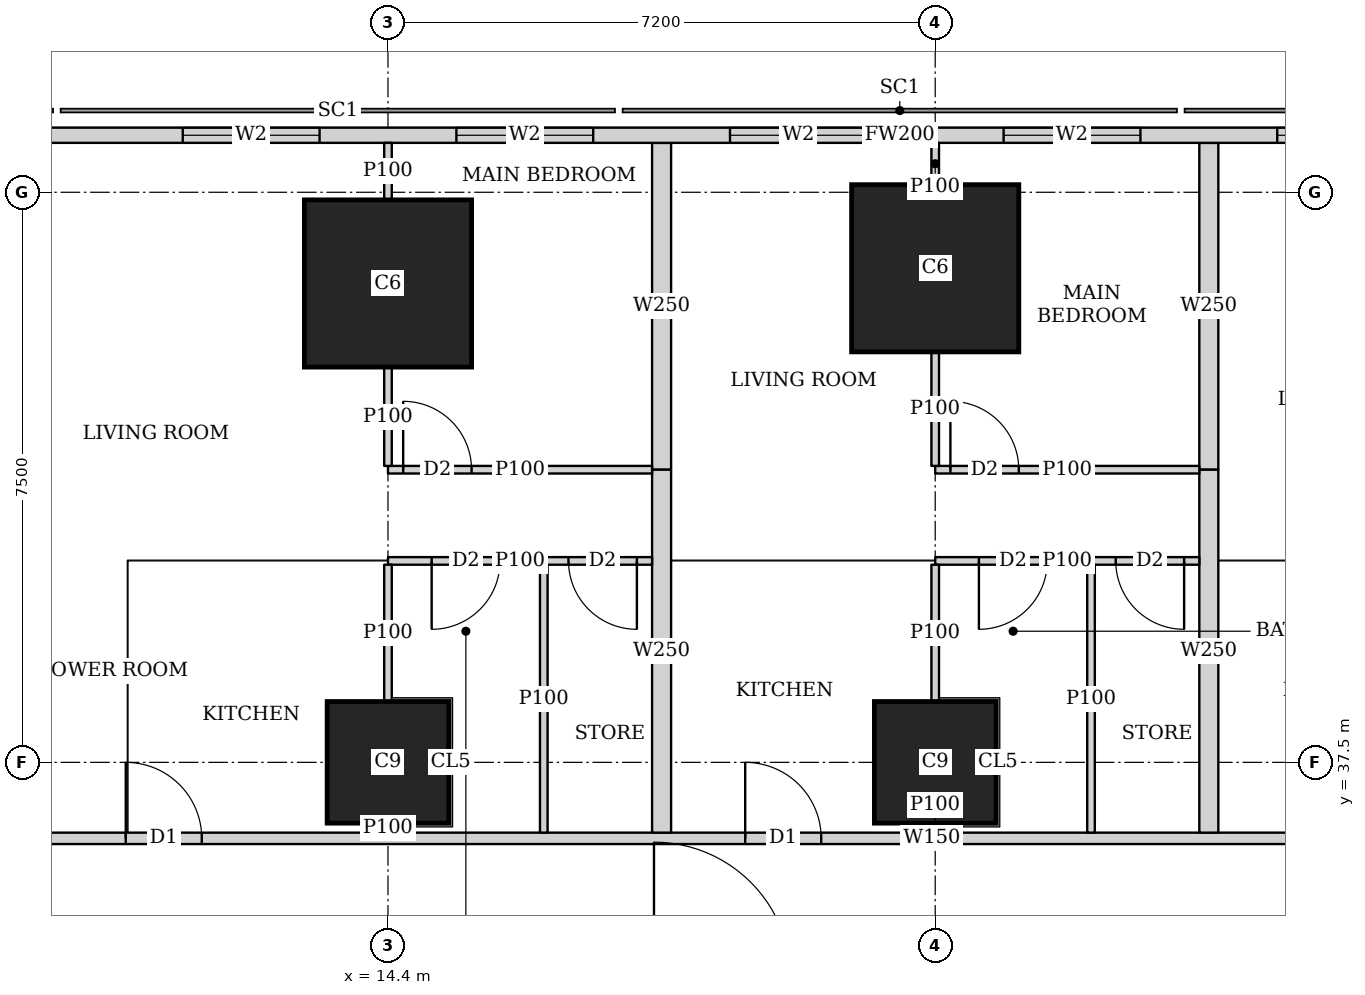
"""IFC4 building model, lengths in metres.
Left out: names, types, materials, properties, quantities, classifications, styles, units other than length and angle.
Written with IfcOpenShell. Run it as: python <this file> out.ifc"""

import sys

from ifc_helpers import new_model, si_unit, direction, frame, frame_2d, origin, origin_2d, place, context, subcontext, project, spatial, rectangle, extrude, element, fill, save


model = new_model("IFC4")
c1 = context("Model", 3, precision=1e-05, world=origin(), true_north=direction((0.0, 1.0)))
c2 = subcontext(c1, "Body", "Model", "MODEL_VIEW")
j1 = project(units=[si_unit("LENGTHUNIT", "METRE"), si_unit("PLANEANGLEUNIT", "RADIAN")], contexts=[c1])
p1 = place(None, origin())
s1 = spatial("IfcSite", under=j1, at=p1, CompositionType="ELEMENT")
p2 = place(p1, origin())
s2 = spatial("IfcBuilding", under=s1, at=p2, CompositionType="ELEMENT")
p3 = place(p2, frame((0.0, 0.0, 89.15)))
s3 = spatial("IfcBuildingStorey", under=s2, at=p3, CompositionType="ELEMENT", Elevation=89.15)
for number, where, z_axis, x_axis in (
    (1, (14.4, 37.5, 0.0), (0.0, 0.0, 1.0), (1.0, 0.0, 0.0)),
    (2, (21.6, 37.5, 0.0), (0.0, 0.0, 1.0), (1.0, 0.0, 0.0)),
):
    element("IfcColumn", number, at=place(p3, frame(where, z_axis=z_axis, x_axis=x_axis)), inside=s3, PredefinedType="COLUMN", context=c2, shape_type="SweptSolid", body=[
        extrude(rectangle(XDim=1.6, YDim=1.6, at=origin_2d()), origin(), (0.0, 0.0, 1.0), 3.75),
    ])
for number, where, z_axis, x_axis in (
    (3, (14.4, 43.8, 0.0), (0.0, 0.0, 1.0), (1.0, 0.0, 0.0)),
    (4, (21.6, 44.0, 0.0), (0.0, 0.0, 1.0), (1.0, 0.0, 0.0)),
):
    element("IfcColumn", number, at=place(p3, frame(where, z_axis=z_axis, x_axis=x_axis)), inside=s3, PredefinedType="COLUMN", context=c2, shape_type="SweptSolid", body=[
        extrude(rectangle(XDim=2.2, YDim=2.2, at=origin_2d()), origin(), (0.0, 0.0, 1.0), 3.75),
    ])
p4 = place(p3, frame((40.106, 45.75, 0.0), z_axis=(0.0, 0.0, 1.0), x_axis=(-1.0, 0.0, 0.0)))
e5 = element("IfcWall", 5, at=p4, inside=s3, PredefinedType="SOLIDWALL", context=c2, shape_type="SweptSolid", body=[
    extrude(rectangle(XDim=37.943, YDim=0.2, at=frame_2d((18.971, 0.0))), origin(), (0.0, 0.0, 1.0), 3.5),
])
p5 = place(p4, frame((8.606, 0.0, 0.9)))
e6 = element("IfcOpeningElement", 6, at=p5, cuts=e5, PredefinedType="OPENING", context=c2, shape_type="SweptSolid", body=[
    extrude(rectangle(XDim=1.8, YDim=1.5, at=frame_2d((0.9, 0.75))), frame((0.0, 0.11, 0.0), z_axis=(0.0, -1.0, 0.0), x_axis=(1.0, 0.0, 0.0)), (0.0, 0.0, 1.0), 0.22),
])
p6 = place(p4, frame((12.206, 0.0, 0.9)))
e7 = element("IfcOpeningElement", 7, at=p6, cuts=e5, PredefinedType="OPENING", context=c2, shape_type="SweptSolid", body=[
    extrude(rectangle(XDim=1.8, YDim=1.5, at=frame_2d((0.9, 0.75))), frame((0.0, 0.11, 0.0), z_axis=(0.0, -1.0, 0.0), x_axis=(1.0, 0.0, 0.0)), (0.0, 0.0, 1.0), 0.22),
])
p7 = place(p4, frame((15.806, 0.0, 0.9)))
e8 = element("IfcOpeningElement", 8, at=p7, cuts=e5, PredefinedType="OPENING", context=c2, shape_type="SweptSolid", body=[
    extrude(rectangle(XDim=1.8, YDim=1.5, at=frame_2d((0.9, 0.75))), frame((0.0, 0.11, 0.0), z_axis=(0.0, -1.0, 0.0), x_axis=(1.0, 0.0, 0.0)), (0.0, 0.0, 1.0), 0.22),
])
p8 = place(p4, frame((19.406, 0.0, 0.9)))
e9 = element("IfcOpeningElement", 9, at=p8, cuts=e5, PredefinedType="OPENING", context=c2, shape_type="SweptSolid", body=[
    extrude(rectangle(XDim=1.8, YDim=1.5, at=frame_2d((0.9, 0.75))), frame((0.0, 0.11, 0.0), z_axis=(0.0, -1.0, 0.0), x_axis=(1.0, 0.0, 0.0)), (0.0, 0.0, 1.0), 0.22),
])
p9 = place(p4, frame((23.006, 0.0, 0.9)))
e10 = element("IfcOpeningElement", 10, at=p9, cuts=e5, PredefinedType="OPENING", context=c2, shape_type="SweptSolid", body=[
    extrude(rectangle(XDim=1.8, YDim=1.5, at=frame_2d((0.9, 0.75))), frame((0.0, 0.11, 0.0), z_axis=(0.0, -1.0, 0.0), x_axis=(1.0, 0.0, 0.0)), (0.0, 0.0, 1.0), 0.22),
])
p10 = place(p4, frame((26.606, 0.0, 0.9)))
e11 = element("IfcOpeningElement", 11, at=p10, cuts=e5, PredefinedType="OPENING", context=c2, shape_type="SweptSolid", body=[
    extrude(rectangle(XDim=1.8, YDim=1.5, at=frame_2d((0.9, 0.75))), frame((0.0, 0.11, 0.0), z_axis=(0.0, -1.0, 0.0), x_axis=(1.0, 0.0, 0.0)), (0.0, 0.0, 1.0), 0.22),
])
p11 = place(p3, frame((8.35, 36.5, 0.0), z_axis=(0.0, 0.0, 1.0), x_axis=(1.0, 0.0, 0.0)))
e12 = element("IfcWall", 12, at=p11, inside=s3, PredefinedType="SOLIDWALL", context=c2, shape_type="SweptSolid", body=[
    extrude(rectangle(XDim=26.415, YDim=0.15, at=frame_2d((13.208, 0.0))), origin(), (0.0, 0.0, 1.0), 3.5),
])
p12 = place(p11, frame((2.6, 0.0, 0.0)))
e13 = element("IfcOpeningElement", 13, at=p12, cuts=e12, PredefinedType="OPENING", context=c2, shape_type="SweptSolid", body=[
    extrude(rectangle(XDim=1.0, YDim=2.1, at=frame_2d((0.5, 1.05))), frame((0.0, 0.085, 0.0), z_axis=(0.0, -1.0, 0.0), x_axis=(1.0, 0.0, 0.0)), (0.0, 0.0, 1.0), 0.17),
])
p13 = place(p11, frame((10.75, 0.0, 0.0)))
e14 = element("IfcOpeningElement", 14, at=p13, cuts=e12, PredefinedType="OPENING", context=c2, shape_type="SweptSolid", body=[
    extrude(rectangle(XDim=1.0, YDim=2.1, at=frame_2d((0.5, 1.05))), frame((0.0, 0.085, 0.0), z_axis=(0.0, -1.0, 0.0), x_axis=(1.0, 0.0, 0.0)), (0.0, 0.0, 1.0), 0.17),
])
p14 = place(p11, frame((18.007, 0.0, 0.0)))
e15 = element("IfcOpeningElement", 15, at=p14, cuts=e12, PredefinedType="OPENING", context=c2, shape_type="SweptSolid", body=[
    extrude(rectangle(XDim=1.0, YDim=2.1, at=frame_2d((0.5, 1.05))), frame((0.0, 0.085, 0.0), z_axis=(0.0, -1.0, 0.0), x_axis=(1.0, 0.0, 0.0)), (0.0, 0.0, 1.0), 0.17),
])
p15 = place(p3, frame((14.4, 41.35, 0.0), z_axis=(0.0, 0.0, 1.0), x_axis=(1.0, 0.0, 0.0)))
e16 = element("IfcWall", 16, at=p15, inside=s3, PredefinedType="PARTITIONING", context=c2, shape_type="SweptSolid", body=[
    extrude(rectangle(XDim=3.475, YDim=0.1, at=frame_2d((1.738, 0.0))), origin(), (0.0, 0.0, 1.0), 3.5),
])
p16 = place(p15, frame((0.2, 0.0, 0.0)))
e17 = element("IfcOpeningElement", 17, at=p16, cuts=e16, PredefinedType="OPENING", context=c2, shape_type="SweptSolid", body=[
    extrude(rectangle(XDim=0.9, YDim=2.1, at=frame_2d((0.45, 1.05))), frame((0.0, 0.06, 0.0), z_axis=(0.0, -1.0, 0.0), x_axis=(1.0, 0.0, 0.0)), (0.0, 0.0, 1.0), 0.12),
])
p17 = place(p3, frame((14.4, 40.15, 0.0), z_axis=(0.0, 0.0, 1.0), x_axis=(1.0, 0.0, 0.0)))
e18 = element("IfcWall", 18, at=p17, inside=s3, PredefinedType="PARTITIONING", context=c2, shape_type="SweptSolid", body=[
    extrude(rectangle(XDim=3.475, YDim=0.1, at=frame_2d((1.738, 0.0))), origin(), (0.0, 0.0, 1.0), 3.5),
])
p18 = place(p17, frame((0.575, 0.0, 0.0)))
e19 = element("IfcOpeningElement", 19, at=p18, cuts=e18, PredefinedType="OPENING", context=c2, shape_type="SweptSolid", body=[
    extrude(rectangle(XDim=0.9, YDim=2.1, at=frame_2d((0.45, 1.05))), frame((0.0, 0.06, 0.0), z_axis=(0.0, -1.0, 0.0), x_axis=(1.0, 0.0, 0.0)), (0.0, 0.0, 1.0), 0.12),
])
p19 = place(p17, frame((2.375, 0.0, 0.0)))
e20 = element("IfcOpeningElement", 20, at=p19, cuts=e18, PredefinedType="OPENING", context=c2, shape_type="SweptSolid", body=[
    extrude(rectangle(XDim=0.9, YDim=2.1, at=frame_2d((0.45, 1.05))), frame((0.0, 0.06, 0.0), z_axis=(0.0, -1.0, 0.0), x_axis=(1.0, 0.0, 0.0)), (0.0, 0.0, 1.0), 0.12),
])
p20 = place(p3, frame((14.4, 41.4, 0.0), z_axis=(0.0, 0.0, 1.0), x_axis=(0.0, 1.0, 0.0)))
e21 = element("IfcWall", 21, at=p20, inside=s3, PredefinedType="PARTITIONING", context=c2, shape_type="SweptSolid", body=[
    extrude(rectangle(XDim=1.299, YDim=0.1, at=frame_2d((0.649, 0.0))), origin(), (0.0, 0.0, 1.0), 3.5),
])
p21 = place(p3, frame((14.4, 44.901, 0.0), z_axis=(0.0, 0.0, 1.0), x_axis=(0.0, 1.0, 0.0)))
e22 = element("IfcWall", 22, at=p21, inside=s3, PredefinedType="PARTITIONING", context=c2, shape_type="SweptSolid", body=[
    extrude(rectangle(XDim=0.749, YDim=0.1, at=frame_2d((0.375, 0.0))), origin(), (0.0, 0.0, 1.0), 3.5),
])
p22 = place(p3, frame((14.4, 36.575, 0.0), z_axis=(0.0, 0.0, 1.0), x_axis=(0.0, 1.0, 0.0)))
e23 = element("IfcWall", 23, at=p22, inside=s3, PredefinedType="PARTITIONING", context=c2, shape_type="SweptSolid", body=[
    extrude(rectangle(XDim=0.124, YDim=0.1, at=frame_2d((0.062, 0.0))), origin(), (0.0, 0.0, 1.0), 3.5),
])
p23 = place(p3, frame((14.4, 38.301, 0.0), z_axis=(0.0, 0.0, 1.0), x_axis=(0.0, 1.0, 0.0)))
e24 = element("IfcWall", 24, at=p23, inside=s3, PredefinedType="PARTITIONING", context=c2, shape_type="SweptSolid", body=[
    extrude(rectangle(XDim=1.799, YDim=0.1, at=frame_2d((0.899, 0.0))), origin(), (0.0, 0.0, 1.0), 3.5),
])
p24 = place(p3, frame((16.45, 36.575, 0.0), z_axis=(0.0, 0.0, 1.0), x_axis=(0.0, 1.0, 0.0)))
e25 = element("IfcWall", 25, at=p24, inside=s3, PredefinedType="PARTITIONING", context=c2, shape_type="SweptSolid", body=[
    extrude(rectangle(XDim=3.525, YDim=0.1, at=frame_2d((1.763, 0.0))), origin(), (0.0, 0.0, 1.0), 3.5),
])
p25 = place(p3, frame((21.6, 41.35, 0.0), z_axis=(0.0, 0.0, 1.0), x_axis=(1.0, 0.0, 0.0)))
e26 = element("IfcWall", 26, at=p25, inside=s3, PredefinedType="PARTITIONING", context=c2, shape_type="SweptSolid", body=[
    extrude(rectangle(XDim=3.475, YDim=0.1, at=frame_2d((1.737, 0.0))), origin(), (0.0, 0.0, 1.0), 3.5),
])
p26 = place(p25, frame((0.2, 0.0, 0.0)))
e27 = element("IfcOpeningElement", 27, at=p26, cuts=e26, PredefinedType="OPENING", context=c2, shape_type="SweptSolid", body=[
    extrude(rectangle(XDim=0.9, YDim=2.1, at=frame_2d((0.45, 1.05))), frame((0.0, 0.06, 0.0), z_axis=(0.0, -1.0, 0.0), x_axis=(1.0, 0.0, 0.0)), (0.0, 0.0, 1.0), 0.12),
])
p27 = place(p3, frame((21.6, 40.15, 0.0), z_axis=(0.0, 0.0, 1.0), x_axis=(1.0, 0.0, 0.0)))
e28 = element("IfcWall", 28, at=p27, inside=s3, PredefinedType="PARTITIONING", context=c2, shape_type="SweptSolid", body=[
    extrude(rectangle(XDim=3.475, YDim=0.1, at=frame_2d((1.737, 0.0))), origin(), (0.0, 0.0, 1.0), 3.5),
])
p28 = place(p27, frame((0.575, 0.0, 0.0)))
e29 = element("IfcOpeningElement", 29, at=p28, cuts=e28, PredefinedType="OPENING", context=c2, shape_type="SweptSolid", body=[
    extrude(rectangle(XDim=0.9, YDim=2.1, at=frame_2d((0.45, 1.05))), frame((0.0, 0.06, 0.0), z_axis=(0.0, -1.0, 0.0), x_axis=(1.0, 0.0, 0.0)), (0.0, 0.0, 1.0), 0.12),
])
p29 = place(p27, frame((2.375, 0.0, 0.0)))
e30 = element("IfcOpeningElement", 30, at=p29, cuts=e28, PredefinedType="OPENING", context=c2, shape_type="SweptSolid", body=[
    extrude(rectangle(XDim=0.9, YDim=2.1, at=frame_2d((0.45, 1.05))), frame((0.0, 0.06, 0.0), z_axis=(0.0, -1.0, 0.0), x_axis=(1.0, 0.0, 0.0)), (0.0, 0.0, 1.0), 0.12),
])
p30 = place(p3, frame((21.6, 41.4, 0.0), z_axis=(0.0, 0.0, 1.0), x_axis=(0.0, 1.0, 0.0)))
e31 = element("IfcWall", 31, at=p30, inside=s3, PredefinedType="PARTITIONING", context=c2, shape_type="SweptSolid", body=[
    extrude(rectangle(XDim=1.499, YDim=0.1, at=frame_2d((0.75, 0.0))), origin(), (0.0, 0.0, 1.0), 3.5),
])
p31 = place(p3, frame((21.6, 45.101, 0.0), z_axis=(0.0, 0.0, 1.0), x_axis=(0.0, 1.0, 0.0)))
e32 = element("IfcWall", 32, at=p31, inside=s3, PredefinedType="PARTITIONING", context=c2, shape_type="SweptSolid", body=[
    extrude(rectangle(XDim=0.549, YDim=0.1, at=frame_2d((0.274, 0.0))), origin(), (0.0, 0.0, 1.0), 3.5),
])
p32 = place(p3, frame((21.6, 36.575, 0.0), z_axis=(0.0, 0.0, 1.0), x_axis=(0.0, 1.0, 0.0)))
e33 = element("IfcWall", 33, at=p32, inside=s3, PredefinedType="PARTITIONING", context=c2, shape_type="SweptSolid", body=[
    extrude(rectangle(XDim=0.124, YDim=0.1, at=frame_2d((0.062, 0.0))), origin(), (0.0, 0.0, 1.0), 3.5),
])
p33 = place(p3, frame((21.6, 38.301, 0.0), z_axis=(0.0, 0.0, 1.0), x_axis=(0.0, 1.0, 0.0)))
e34 = element("IfcWall", 34, at=p33, inside=s3, PredefinedType="PARTITIONING", context=c2, shape_type="SweptSolid", body=[
    extrude(rectangle(XDim=1.799, YDim=0.1, at=frame_2d((0.899, 0.0))), origin(), (0.0, 0.0, 1.0), 3.5),
])
p34 = place(p3, frame((23.65, 36.575, 0.0), z_axis=(0.0, 0.0, 1.0), x_axis=(0.0, 1.0, 0.0)))
e35 = element("IfcWall", 35, at=p34, inside=s3, PredefinedType="PARTITIONING", context=c2, shape_type="SweptSolid", body=[
    extrude(rectangle(XDim=3.525, YDim=0.1, at=frame_2d((1.763, 0.0))), origin(), (0.0, 0.0, 1.0), 3.5),
])
p35 = place(p3, frame((18.0, 41.35, 0.0), z_axis=(0.0, 0.0, 1.0), x_axis=(0.0, 1.0, 0.0)))
e36 = element("IfcWall", 36, at=p35, inside=s3, PredefinedType="SOLIDWALL", context=c2, shape_type="SweptSolid", body=[
    extrude(rectangle(XDim=4.3, YDim=0.25, at=frame_2d((2.15, 0.0))), origin(), (0.0, 0.0, 1.0), 2.2),
])
p36 = place(p3, frame((18.0, 36.575, 0.0), z_axis=(0.0, 0.0, 1.0), x_axis=(0.0, 1.0, 0.0)))
e37 = element("IfcWall", 37, at=p36, inside=s3, PredefinedType="SOLIDWALL", context=c2, shape_type="SweptSolid", body=[
    extrude(rectangle(XDim=4.775, YDim=0.25, at=frame_2d((2.388, 0.0))), origin(), (0.0, 0.0, 1.0), 3.5),
])
p37 = place(p3, frame((25.2, 41.35, 0.0), z_axis=(0.0, 0.0, 1.0), x_axis=(0.0, 1.0, 0.0)))
e38 = element("IfcWall", 38, at=p37, inside=s3, PredefinedType="SOLIDWALL", context=c2, shape_type="SweptSolid", body=[
    extrude(rectangle(XDim=4.3, YDim=0.25, at=frame_2d((2.15, 0.0))), origin(), (0.0, 0.0, 1.0), 2.2),
])
p38 = place(p3, frame((25.2, 36.575, 0.0), z_axis=(0.0, 0.0, 1.0), x_axis=(0.0, 1.0, 0.0)))
e39 = element("IfcWall", 39, at=p38, inside=s3, PredefinedType="SOLIDWALL", context=c2, shape_type="SweptSolid", body=[
    extrude(rectangle(XDim=4.775, YDim=0.25, at=frame_2d((2.388, 0.0))), origin(), (0.0, 0.0, 1.0), 3.5),
])
p39 = place(p6, origin())
e40 = element("IfcWindow", 40, at=p39, inside=s3, PartitioningType="SINGLE_PANEL", PredefinedType="WINDOW", context=c2, shape_type="SweptSolid", body=[
    extrude(rectangle(XDim=1.8, YDim=1.5, at=frame_2d((0.9, 0.75))), frame((0.0, 0.03, 0.0), z_axis=(0.0, -1.0, 0.0), x_axis=(1.0, 0.0, 0.0)), (0.0, 0.0, 1.0), 0.06),
])
fill(e7, e40)
p40 = place(p7, origin())
e41 = element("IfcWindow", 41, at=p40, inside=s3, PartitioningType="SINGLE_PANEL", PredefinedType="WINDOW", context=c2, shape_type="SweptSolid", body=[
    extrude(rectangle(XDim=1.8, YDim=1.5, at=frame_2d((0.9, 0.75))), frame((0.0, 0.03, 0.0), z_axis=(0.0, -1.0, 0.0), x_axis=(1.0, 0.0, 0.0)), (0.0, 0.0, 1.0), 0.06),
])
fill(e8, e41)
p41 = place(p8, origin())
e42 = element("IfcWindow", 42, at=p41, inside=s3, PartitioningType="SINGLE_PANEL", PredefinedType="WINDOW", context=c2, shape_type="SweptSolid", body=[
    extrude(rectangle(XDim=1.8, YDim=1.5, at=frame_2d((0.9, 0.75))), frame((0.0, 0.03, 0.0), z_axis=(0.0, -1.0, 0.0), x_axis=(1.0, 0.0, 0.0)), (0.0, 0.0, 1.0), 0.06),
])
fill(e9, e42)
p42 = place(p9, origin())
e43 = element("IfcWindow", 43, at=p42, inside=s3, PartitioningType="SINGLE_PANEL", PredefinedType="WINDOW", context=c2, shape_type="SweptSolid", body=[
    extrude(rectangle(XDim=1.8, YDim=1.5, at=frame_2d((0.9, 0.75))), frame((0.0, 0.03, 0.0), z_axis=(0.0, -1.0, 0.0), x_axis=(1.0, 0.0, 0.0)), (0.0, 0.0, 1.0), 0.06),
])
fill(e10, e43)
p43 = place(p10, origin())
e44 = element("IfcWindow", 44, at=p43, inside=s3, PartitioningType="SINGLE_PANEL", PredefinedType="WINDOW", context=c2, shape_type="SweptSolid", body=[
    extrude(rectangle(XDim=1.8, YDim=1.5, at=frame_2d((0.9, 0.75))), frame((0.0, 0.03, 0.0), z_axis=(0.0, -1.0, 0.0), x_axis=(1.0, 0.0, 0.0)), (0.0, 0.0, 1.0), 0.06),
])
fill(e11, e44)
p44 = place(p16, origin())
e45 = element("IfcDoor", 45, at=p44, inside=s3, OperationType="SINGLE_SWING_LEFT", PredefinedType="DOOR", context=c2, shape_type="SweptSolid", body=[
    extrude(rectangle(XDim=0.9, YDim=2.1, at=frame_2d((0.45, 1.05))), frame((0.0, 0.025, 0.0), z_axis=(0.0, -1.0, 0.0), x_axis=(1.0, 0.0, 0.0)), (0.0, 0.0, 1.0), 0.05),
])
fill(e17, e45)
p45 = place(p18, origin())
e46 = element("IfcDoor", 46, at=p45, inside=s3, OperationType="SINGLE_SWING_RIGHT", PredefinedType="DOOR", context=c2, shape_type="SweptSolid", body=[
    extrude(rectangle(XDim=0.9, YDim=2.1, at=frame_2d((0.45, 1.05))), frame((0.0, 0.025, 0.0), z_axis=(0.0, -1.0, 0.0), x_axis=(1.0, 0.0, 0.0)), (0.0, 0.0, 1.0), 0.05),
])
fill(e19, e46)
p46 = place(p19, origin())
e47 = element("IfcDoor", 47, at=p46, inside=s3, OperationType="SINGLE_SWING_LEFT", PredefinedType="DOOR", context=c2, shape_type="SweptSolid", body=[
    extrude(rectangle(XDim=0.9, YDim=2.1, at=frame_2d((0.45, 1.05))), frame((0.0, 0.025, 0.0), z_axis=(0.0, -1.0, 0.0), x_axis=(1.0, 0.0, 0.0)), (0.0, 0.0, 1.0), 0.05),
])
fill(e20, e47)
p47 = place(p12, origin())
e48 = element("IfcDoor", 48, at=p47, inside=s3, OperationType="SINGLE_SWING_LEFT", PredefinedType="DOOR", context=c2, shape_type="SweptSolid", body=[
    extrude(rectangle(XDim=1.0, YDim=2.1, at=frame_2d((0.5, 1.05))), frame((0.0, 0.025, 0.0), z_axis=(0.0, -1.0, 0.0), x_axis=(1.0, 0.0, 0.0)), (0.0, 0.0, 1.0), 0.05),
])
fill(e13, e48)
p48 = place(p26, origin())
e49 = element("IfcDoor", 49, at=p48, inside=s3, OperationType="SINGLE_SWING_LEFT", PredefinedType="DOOR", context=c2, shape_type="SweptSolid", body=[
    extrude(rectangle(XDim=0.9, YDim=2.1, at=frame_2d((0.45, 1.05))), frame((0.0, 0.025, 0.0), z_axis=(0.0, -1.0, 0.0), x_axis=(1.0, 0.0, 0.0)), (0.0, 0.0, 1.0), 0.05),
])
fill(e27, e49)
p49 = place(p28, origin())
e50 = element("IfcDoor", 50, at=p49, inside=s3, OperationType="SINGLE_SWING_RIGHT", PredefinedType="DOOR", context=c2, shape_type="SweptSolid", body=[
    extrude(rectangle(XDim=0.9, YDim=2.1, at=frame_2d((0.45, 1.05))), frame((0.0, 0.025, 0.0), z_axis=(0.0, -1.0, 0.0), x_axis=(1.0, 0.0, 0.0)), (0.0, 0.0, 1.0), 0.05),
])
fill(e29, e50)
p50 = place(p29, origin())
e51 = element("IfcDoor", 51, at=p50, inside=s3, OperationType="SINGLE_SWING_LEFT", PredefinedType="DOOR", context=c2, shape_type="SweptSolid", body=[
    extrude(rectangle(XDim=0.9, YDim=2.1, at=frame_2d((0.45, 1.05))), frame((0.0, 0.025, 0.0), z_axis=(0.0, -1.0, 0.0), x_axis=(1.0, 0.0, 0.0)), (0.0, 0.0, 1.0), 0.05),
])
fill(e30, e51)
p51 = place(p13, origin())
e52 = element("IfcDoor", 52, at=p51, inside=s3, OperationType="SINGLE_SWING_LEFT", PredefinedType="DOOR", context=c2, shape_type="SweptSolid", body=[
    extrude(rectangle(XDim=1.0, YDim=2.1, at=frame_2d((0.5, 1.05))), frame((0.0, 0.025, 0.0), z_axis=(0.0, -1.0, 0.0), x_axis=(1.0, 0.0, 0.0)), (0.0, 0.0, 1.0), 0.05),
])
fill(e14, e52)
save(model, sys.argv[1])
